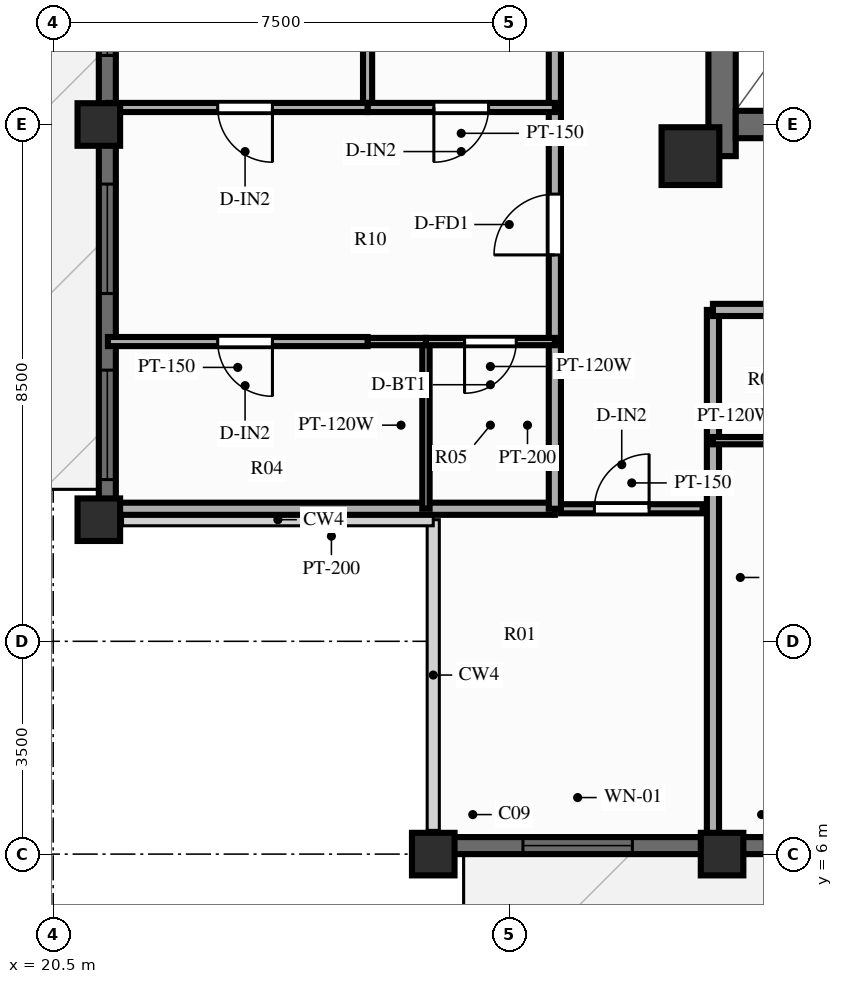
"""IFC4 building model, lengths in metres.
Left out: names, types, materials, properties, quantities, classifications, styles, units other than length and angle.
Written with IfcOpenShell. Run it as: python <this file> out.ifc"""

import sys

from ifc_helpers import new_model, si_unit, direction, frame, frame_2d, origin, origin_2d, place, context, subcontext, project, spatial, rectangle, extrude, source, transform, mapped, element, fill, save


model = new_model("IFC4")
c1 = context("Model", 3, precision=1e-05, world=origin(), true_north=direction((0.0, 1.0)))
c2 = subcontext(c1, "Body", "Model", "MODEL_VIEW")
j1 = project(units=[si_unit("LENGTHUNIT", "METRE"), si_unit("PLANEANGLEUNIT", "RADIAN")], contexts=[c1])
p1 = place(None, origin())
s1 = spatial("IfcSite", under=j1, at=p1, CompositionType="ELEMENT")
p2 = place(p1, origin())
s2 = spatial("IfcBuilding", under=s1, at=p2, CompositionType="ELEMENT")
p3 = place(p2, frame((0.0, 0.0, 226.2)))
s3 = spatial("IfcBuildingStorey", under=s2, at=p3, CompositionType="ELEMENT", Elevation=226.2)
p4 = place(p3, frame((31.5, 17.48, 0.0), z_axis=(0.0, 0.0, 1.0), x_axis=(0.0, 1.0, 0.0)))
e1 = element("IfcWall", 1, at=p4, inside=s3, PredefinedType="SHEAR", context=c2, shape_type="SweptSolid", body=[
    extrude(rectangle(XDim=19.04, YDim=0.45, at=frame_2d((9.52, 0.0))), origin(), (0.0, 0.0, 1.0), 3.9),
])
p5 = place(p4, frame((6.32, 0.0, 0.0)))
e2 = element("IfcOpeningElement", 2, at=p5, cuts=e1, PredefinedType="OPENING", context=c2, shape_type="SweptSolid", body=[
    extrude(rectangle(XDim=1.1, YDim=2.15, at=frame_2d((0.55, 1.075))), frame((0.0, 0.237, 0.0), z_axis=(0.0, -1.0, 0.0), x_axis=(1.0, 0.0, 0.0)), (0.0, 0.0, 1.0), 0.474),
])
p6 = place(p3, frame((31.725, 18.0, 0.0), z_axis=(0.0, 0.0, 1.0), x_axis=(1.0, 0.0, 0.0)))
e3 = element("IfcWall", 3, at=p6, inside=s3, PredefinedType="SHEAR", context=c2, shape_type="SweptSolid", body=[
    extrude(rectangle(XDim=12.55, YDim=0.45, at=frame_2d((6.275, 0.0))), origin(), (0.0, 0.0, 1.0), 3.9),
])
m1 = source(origin(), c2, "Body", "SweptSolid", [
    extrude(rectangle(XDim=0.95, YDim=0.95, at=origin_2d()), origin(), (0.0, 0.0, 1.0), 3.9),
])
p7 = place(p3, frame((30.98, 17.48, 0.0), z_axis=(0.0, 0.0, 1.0), x_axis=(1.0, 0.0, 0.0)))
e4 = element("IfcColumn", 4, at=p7, inside=s3, PredefinedType="COLUMN", context=c2, shape_type="MappedRepresentation", body=[
    mapped(m1, transform((0.0, 0.0, 0.0), scale=1.0)),
])
m2 = source(origin(), c2, "Body", "SweptSolid", [
    extrude(rectangle(XDim=0.7, YDim=0.7, at=origin_2d()), origin(), (0.0, 0.0, 1.0), 3.9),
])
for number, where, z_axis, x_axis in (
    (5, (26.75, 6.0, 0.0), (0.0, 0.0, 1.0), (1.0, 0.0, 0.0)),
    (6, (31.5, 6.0, 0.0), (0.0, 0.0, 1.0), (1.0, 0.0, 0.0)),
    (7, (21.25, 18.0, 0.0), (0.0, 0.0, 1.0), (1.0, 0.0, 0.0)),
    (8, (21.25, 11.5, 0.0), (0.0, 0.0, 1.0), (1.0, 0.0, 0.0)),
):
    element("IfcColumn", number, at=place(p3, frame(where, z_axis=z_axis, x_axis=x_axis)), inside=s3, PredefinedType="COLUMN", context=c2, shape_type="MappedRepresentation", body=[
        mapped(m2, transform((0.0, 0.0, 0.0), scale=1.0)),
    ])
p8 = place(p3, frame((26.75, 6.14, 0.0), z_axis=(0.0, 0.0, 1.0), x_axis=(1.0, 0.0, 0.0)))
e9 = element("IfcWall", 9, at=p8, inside=s3, PredefinedType="SOLIDWALL", context=c2, shape_type="SweptSolid", body=[
    extrude(rectangle(XDim=22.5, YDim=0.28, at=frame_2d((11.25, 0.0))), origin(), (0.0, 0.0, 1.0), 2.79),
])
p9 = place(p8, frame((1.475, 0.0, 0.85)))
e10 = element("IfcOpeningElement", 10, at=p9, cuts=e9, PredefinedType="OPENING", context=c2, shape_type="SweptSolid", body=[
    extrude(rectangle(XDim=1.8, YDim=1.65, at=frame_2d((0.9, 0.825))), frame((0.0, 0.152, 0.0), z_axis=(0.0, -1.0, 0.0), x_axis=(1.0, 0.0, 0.0)), (0.0, 0.0, 1.0), 0.304),
])
p10 = place(p8, frame((5.445, 0.0, 0.85)))
e11 = element("IfcOpeningElement", 11, at=p10, cuts=e9, PredefinedType="OPENING", context=c2, shape_type="SweptSolid", body=[
    extrude(rectangle(XDim=1.5, YDim=1.65, at=frame_2d((0.75, 0.825))), frame((0.0, 0.152, 0.0), z_axis=(0.0, -1.0, 0.0), x_axis=(1.0, 0.0, 0.0)), (0.0, 0.0, 1.0), 0.304),
])
p11 = place(p8, frame((8.45, 0.0, 0.85)))
e12 = element("IfcOpeningElement", 12, at=p11, cuts=e9, PredefinedType="OPENING", context=c2, shape_type="SweptSolid", body=[
    extrude(rectangle(XDim=1.8, YDim=1.65, at=frame_2d((0.9, 0.825))), frame((0.0, 0.152, 0.0), z_axis=(0.0, -1.0, 0.0), x_axis=(1.0, 0.0, 0.0)), (0.0, 0.0, 1.0), 0.304),
])
p12 = place(p8, frame((13.7, 0.0, 0.0), z_axis=(0.0, 0.0, 1.0), x_axis=(-1.0, 0.0, 0.0)))
e13 = element("IfcOpeningElement", 13, at=p12, cuts=e9, PredefinedType="OPENING", context=c2, shape_type="SweptSolid", body=[
    extrude(rectangle(XDim=1.1, YDim=2.15, at=frame_2d((0.55, 1.075))), frame((0.0, 0.152, 0.0), z_axis=(0.0, -1.0, 0.0), x_axis=(1.0, 0.0, 0.0)), (0.0, 0.0, 1.0), 0.304),
])
p13 = place(p8, frame((15.555, 0.0, 0.85)))
e14 = element("IfcOpeningElement", 14, at=p13, cuts=e9, PredefinedType="OPENING", context=c2, shape_type="SweptSolid", body=[
    extrude(rectangle(XDim=1.5, YDim=1.65, at=frame_2d((0.75, 0.825))), frame((0.0, 0.152, 0.0), z_axis=(0.0, -1.0, 0.0), x_axis=(1.0, 0.0, 0.0)), (0.0, 0.0, 1.0), 0.304),
])
p14 = place(p8, frame((19.225, 0.0, 0.85)))
e15 = element("IfcOpeningElement", 15, at=p14, cuts=e9, PredefinedType="OPENING", context=c2, shape_type="SweptSolid", body=[
    extrude(rectangle(XDim=1.8, YDim=1.65, at=frame_2d((0.9, 0.825))), frame((0.0, 0.152, 0.0), z_axis=(0.0, -1.0, 0.0), x_axis=(1.0, 0.0, 0.0)), (0.0, 0.0, 1.0), 0.304),
])
p15 = place(p3, frame((21.39, 11.5, 0.0), z_axis=(0.0, 0.0, 1.0), x_axis=(0.0, 1.0, 0.0)))
e16 = element("IfcWall", 16, at=p15, inside=s3, PredefinedType="SOLIDWALL", context=c2, shape_type="SweptSolid", body=[
    extrude(rectangle(XDim=31.0, YDim=0.28, at=frame_2d((15.5, 0.0))), origin(), (0.0, 0.0, 1.0), 2.79),
])
p16 = place(p15, frame((0.66, 0.0, 0.85)))
e17 = element("IfcOpeningElement", 17, at=p16, cuts=e16, PredefinedType="OPENING", context=c2, shape_type="SweptSolid", body=[
    extrude(rectangle(XDim=1.8, YDim=1.65, at=frame_2d((0.9, 0.825))), frame((0.0, 0.152, 0.0), z_axis=(0.0, -1.0, 0.0), x_axis=(1.0, 0.0, 0.0)), (0.0, 0.0, 1.0), 0.304),
])
p17 = place(p15, frame((3.72, 0.0, 0.85)))
e18 = element("IfcOpeningElement", 18, at=p17, cuts=e16, PredefinedType="OPENING", context=c2, shape_type="SweptSolid", body=[
    extrude(rectangle(XDim=1.8, YDim=1.65, at=frame_2d((0.9, 0.825))), frame((0.0, 0.152, 0.0), z_axis=(0.0, -1.0, 0.0), x_axis=(1.0, 0.0, 0.0)), (0.0, 0.0, 1.0), 0.304),
])
p18 = place(p15, frame((7.635, 0.0, 0.85)))
e19 = element("IfcOpeningElement", 19, at=p18, cuts=e16, PredefinedType="OPENING", context=c2, shape_type="SweptSolid", body=[
    extrude(rectangle(XDim=1.8, YDim=1.65, at=frame_2d((0.9, 0.825))), frame((0.0, 0.152, 0.0), z_axis=(0.0, -1.0, 0.0), x_axis=(1.0, 0.0, 0.0)), (0.0, 0.0, 1.0), 0.304),
])
p19 = place(p15, frame((10.766, 0.0, 0.85)))
e20 = element("IfcOpeningElement", 20, at=p19, cuts=e16, PredefinedType="OPENING", context=c2, shape_type="SweptSolid", body=[
    extrude(rectangle(XDim=1.8, YDim=1.65, at=frame_2d((0.9, 0.825))), frame((0.0, 0.152, 0.0), z_axis=(0.0, -1.0, 0.0), x_axis=(1.0, 0.0, 0.0)), (0.0, 0.0, 1.0), 0.304),
])
p20 = place(p15, frame((14.0, 0.0, 0.0)))
e21 = element("IfcOpeningElement", 21, at=p20, cuts=e16, PredefinedType="OPENING", context=c2, shape_type="SweptSolid", body=[
    extrude(rectangle(XDim=1.6, YDim=2.15, at=frame_2d((0.8, 1.075))), frame((0.0, 0.152, 0.0), z_axis=(0.0, -1.0, 0.0), x_axis=(1.0, 0.0, 0.0)), (0.0, 0.0, 1.0), 0.304),
])
p21 = place(p15, frame((17.581, 0.0, 0.85)))
e22 = element("IfcOpeningElement", 22, at=p21, cuts=e16, PredefinedType="OPENING", context=c2, shape_type="SweptSolid", body=[
    extrude(rectangle(XDim=1.8, YDim=1.65, at=frame_2d((0.9, 0.825))), frame((0.0, 0.152, 0.0), z_axis=(0.0, -1.0, 0.0), x_axis=(1.0, 0.0, 0.0)), (0.0, 0.0, 1.0), 0.304),
])
p22 = place(p15, frame((20.877, 0.0, 0.85)))
e23 = element("IfcOpeningElement", 23, at=p22, cuts=e16, PredefinedType="OPENING", context=c2, shape_type="SweptSolid", body=[
    extrude(rectangle(XDim=1.8, YDim=1.65, at=frame_2d((0.9, 0.825))), frame((0.0, 0.152, 0.0), z_axis=(0.0, -1.0, 0.0), x_axis=(1.0, 0.0, 0.0)), (0.0, 0.0, 1.0), 0.304),
])
p23 = place(p15, frame((25.176, 0.0, 0.85)))
e24 = element("IfcOpeningElement", 24, at=p23, cuts=e16, PredefinedType="OPENING", context=c2, shape_type="SweptSolid", body=[
    extrude(rectangle(XDim=1.2, YDim=1.5, at=frame_2d((0.6, 0.75))), frame((0.0, 0.152, 0.0), z_axis=(0.0, -1.0, 0.0), x_axis=(1.0, 0.0, 0.0)), (0.0, 0.0, 1.0), 0.304),
])
p24 = place(p15, frame((27.936, 0.0, 0.85)))
e25 = element("IfcOpeningElement", 25, at=p24, cuts=e16, PredefinedType="OPENING", context=c2, shape_type="SweptSolid", body=[
    extrude(rectangle(XDim=1.8, YDim=1.65, at=frame_2d((0.9, 0.825))), frame((0.0, 0.152, 0.0), z_axis=(0.0, -1.0, 0.0), x_axis=(1.0, 0.0, 0.0)), (0.0, 0.0, 1.0), 0.304),
])
p25 = place(p3, frame((28.85, 11.68, 0.0), z_axis=(0.0, 0.0, 1.0), x_axis=(1.0, 0.0, 0.0)))
e26 = element("IfcWall", 26, at=p25, inside=s3, PredefinedType="PARTITIONING", context=c2, shape_type="SweptSolid", body=[
    extrude(rectangle(XDim=2.33, YDim=0.15, at=frame_2d((1.165, 0.0))), origin(), (0.0, 0.0, 1.0), 3.69),
])
p26 = place(p25, frame((0.55, 0.0, 0.0)))
e27 = element("IfcOpeningElement", 27, at=p26, cuts=e26, PredefinedType="OPENING", context=c2, shape_type="SweptSolid", body=[
    extrude(rectangle(XDim=0.9, YDim=2.1, at=frame_2d((0.45, 1.05))), frame((0.0, 0.087, 0.0), z_axis=(0.0, -1.0, 0.0), x_axis=(1.0, 0.0, 0.0)), (0.0, 0.0, 1.0), 0.174),
])
p27 = place(p3, frame((31.35, 14.95, 0.0), z_axis=(0.0, 0.0, 1.0), x_axis=(0.0, -1.0, 0.0)))
e28 = element("IfcWall", 28, at=p27, inside=s3, PredefinedType="PARTITIONING", context=c2, shape_type="SweptSolid", body=[
    extrude(rectangle(XDim=8.8, YDim=0.2, at=frame_2d((4.4, 0.0))), origin(), (0.0, 0.0, 1.0), 2.79),
])
p28 = place(p3, frame((31.35, 14.95, 0.0), z_axis=(0.0, 0.0, 1.0), x_axis=(1.0, 0.0, 0.0)))
e29 = element("IfcWall", 29, at=p28, inside=s3, PredefinedType="PARTITIONING", context=c2, shape_type="SweptSolid", body=[
    extrude(rectangle(XDim=2.85, YDim=0.2, at=frame_2d((1.425, 0.0))), origin(), (0.0, 0.0, 1.0), 3.69),
])
p29 = place(p3, frame((31.35, 12.8, 0.0), z_axis=(0.0, 0.0, 1.0), x_axis=(1.0, 0.0, 0.0)))
e30 = element("IfcWall", 30, at=p29, inside=s3, PredefinedType="PARTITIONING", context=c2, shape_type="SweptSolid", body=[
    extrude(rectangle(XDim=2.85, YDim=0.12, at=frame_2d((1.425, 0.0))), origin(), (0.0, 0.0, 1.0), 3.69),
])
p30 = place(p3, frame((28.75, 11.68, 0.0), z_axis=(0.0, 0.0, 1.0), x_axis=(-1.0, 0.0, 0.0)))
e31 = element("IfcWall", 31, at=p30, inside=s3, PredefinedType="PARTITIONING", context=c2, shape_type="SweptSolid", body=[
    extrude(rectangle(XDim=7.35, YDim=0.2, at=frame_2d((3.675, 0.0))), origin(), (0.0, 0.0, 1.0), 3.69),
])
p31 = place(p3, frame((28.75, 11.68, 0.0), z_axis=(0.0, 0.0, 1.0), x_axis=(0.0, 1.0, 0.0)))
e32 = element("IfcWall", 32, at=p31, inside=s3, PredefinedType="PARTITIONING", context=c2, shape_type="SweptSolid", body=[
    extrude(rectangle(XDim=2.75, YDim=0.2, at=frame_2d((1.375, 0.0))), origin(), (0.0, 0.0, 1.0), 3.69),
])
p32 = place(p3, frame((28.75, 14.43, 0.0), z_axis=(0.0, 0.0, 1.0), x_axis=(0.0, 1.0, 0.0)))
e33 = element("IfcWall", 33, at=p32, inside=s3, PredefinedType="PARTITIONING", context=c2, shape_type="SweptSolid", body=[
    extrude(rectangle(XDim=3.85, YDim=0.2, at=frame_2d((1.925, 0.0))), origin(), (0.0, 0.0, 1.0), 3.69),
])
p33 = place(p32, frame((1.425, 0.0, 0.0)))
e34 = element("IfcOpeningElement", 34, at=p33, cuts=e33, PredefinedType="OPENING", context=c2, shape_type="SweptSolid", body=[
    extrude(rectangle(XDim=1.0, YDim=2.15, at=frame_2d((0.5, 1.075))), frame((0.0, 0.112, 0.0), z_axis=(0.0, -1.0, 0.0), x_axis=(1.0, 0.0, 0.0)), (0.0, 0.0, 1.0), 0.224),
])
p34 = place(p3, frame((28.75, 18.28, 0.0), z_axis=(0.0, 0.0, 1.0), x_axis=(0.0, 1.0, 0.0)))
e35 = element("IfcWall", 35, at=p34, inside=s3, PredefinedType="PARTITIONING", context=c2, shape_type="SweptSolid", body=[
    extrude(rectangle(XDim=3.511, YDim=0.2, at=frame_2d((1.756, 0.0))), origin(), (0.0, 0.0, 1.0), 3.69),
])
p35 = place(p3, frame((26.63, 11.68, 0.0), z_axis=(0.0, 0.0, 1.0), x_axis=(0.0, 1.0, 0.0)))
e36 = element("IfcWall", 36, at=p35, inside=s3, PredefinedType="PARTITIONING", context=c2, shape_type="SweptSolid", body=[
    extrude(rectangle(XDim=2.75, YDim=0.12, at=frame_2d((1.375, 0.0))), origin(), (0.0, 0.0, 1.0), 3.69),
])
p36 = place(p3, frame((25.67, 18.28, 0.0), z_axis=(0.0, 0.0, 1.0), x_axis=(0.0, 1.0, 0.0)))
e37 = element("IfcWall", 37, at=p36, inside=s3, PredefinedType="PARTITIONING", context=c2, shape_type="SweptSolid", body=[
    extrude(rectangle(XDim=3.511, YDim=0.15, at=frame_2d((1.756, 0.0))), origin(), (0.0, 0.0, 1.0), 3.39),
])
p37 = place(p3, frame((28.75, 14.43, 0.0), z_axis=(0.0, 0.0, 1.0), x_axis=(-1.0, 0.0, 0.0)))
e38 = element("IfcWall", 38, at=p37, inside=s3, PredefinedType="PARTITIONING", context=c2, shape_type="SweptSolid", body=[
    extrude(rectangle(XDim=2.12, YDim=0.12, at=frame_2d((1.06, 0.0))), origin(), (0.0, 0.0, 1.0), 3.69),
])
p38 = place(p37, frame((0.635, 0.0, 0.0)))
e39 = element("IfcOpeningElement", 39, at=p38, cuts=e38, PredefinedType="OPENING", context=c2, shape_type="SweptSolid", body=[
    extrude(rectangle(XDim=0.85, YDim=2.05, at=frame_2d((0.425, 1.025))), frame((0.0, 0.072, 0.0), z_axis=(0.0, -1.0, 0.0), x_axis=(1.0, 0.0, 0.0)), (0.0, 0.0, 1.0), 0.144),
])
p39 = place(p3, frame((26.63, 14.43, 0.0), z_axis=(0.0, 0.0, 1.0), x_axis=(-1.0, 0.0, 0.0)))
e40 = element("IfcWall", 40, at=p39, inside=s3, PredefinedType="PARTITIONING", context=c2, shape_type="SweptSolid", body=[
    extrude(rectangle(XDim=0.96, YDim=0.12, at=frame_2d((0.48, 0.0))), origin(), (0.0, 0.0, 1.0), 3.69),
])
p40 = place(p3, frame((25.67, 14.43, 0.0), z_axis=(0.0, 0.0, 1.0), x_axis=(-1.0, 0.0, 0.0)))
e41 = element("IfcWall", 41, at=p40, inside=s3, PredefinedType="PARTITIONING", context=c2, shape_type="SweptSolid", body=[
    extrude(rectangle(XDim=4.27, YDim=0.15, at=frame_2d((2.135, 0.0))), origin(), (0.0, 0.0, 1.0), 3.69),
])
p41 = place(p40, frame((1.565, 0.0, 0.0)))
e42 = element("IfcOpeningElement", 42, at=p41, cuts=e41, PredefinedType="OPENING", context=c2, shape_type="SweptSolid", body=[
    extrude(rectangle(XDim=0.9, YDim=2.1, at=frame_2d((0.45, 1.05))), frame((0.0, 0.087, 0.0), z_axis=(0.0, -1.0, 0.0), x_axis=(1.0, 0.0, 0.0)), (0.0, 0.0, 1.0), 0.174),
])
p42 = place(p3, frame((28.75, 18.28, 0.0), z_axis=(0.0, 0.0, 1.0), x_axis=(-1.0, 0.0, 0.0)))
e43 = element("IfcWall", 43, at=p42, inside=s3, PredefinedType="PARTITIONING", context=c2, shape_type="SweptSolid", body=[
    extrude(rectangle(XDim=3.08, YDim=0.15, at=frame_2d((1.54, 0.0))), origin(), (0.0, 0.0, 1.0), 3.69),
])
p43 = place(p42, frame((1.09, 0.0, 0.0)))
e44 = element("IfcOpeningElement", 44, at=p43, cuts=e43, PredefinedType="OPENING", context=c2, shape_type="SweptSolid", body=[
    extrude(rectangle(XDim=0.9, YDim=2.1, at=frame_2d((0.45, 1.05))), frame((0.0, 0.087, 0.0), z_axis=(0.0, -1.0, 0.0), x_axis=(1.0, 0.0, 0.0)), (0.0, 0.0, 1.0), 0.174),
])
p44 = place(p3, frame((25.67, 18.28, 0.0), z_axis=(0.0, 0.0, 1.0), x_axis=(-1.0, 0.0, 0.0)))
e45 = element("IfcWall", 45, at=p44, inside=s3, PredefinedType="PARTITIONING", context=c2, shape_type="SweptSolid", body=[
    extrude(rectangle(XDim=4.27, YDim=0.15, at=frame_2d((2.135, 0.0))), origin(), (0.0, 0.0, 1.0), 3.69),
])
p45 = place(p44, frame((1.565, 0.0, 0.0)))
e46 = element("IfcOpeningElement", 46, at=p45, cuts=e45, PredefinedType="OPENING", context=c2, shape_type="SweptSolid", body=[
    extrude(rectangle(XDim=0.9, YDim=2.1, at=frame_2d((0.45, 1.05))), frame((0.0, 0.087, 0.0), z_axis=(0.0, -1.0, 0.0), x_axis=(1.0, 0.0, 0.0)), (0.0, 0.0, 1.0), 0.174),
])
m3 = source(origin(), c2, "Body", "SweptSolid", [
    extrude(rectangle(XDim=1.8, YDim=1.65, at=frame_2d((0.9, 0.825))), frame((0.0, 0.03, 0.0), z_axis=(0.0, -1.0, 0.0), x_axis=(1.0, 0.0, 0.0)), (0.0, 0.0, 1.0), 0.06),
])
p46 = place(p9, origin())
e47 = element("IfcWindow", 47, at=p46, inside=s3, PartitioningType="SINGLE_PANEL", PredefinedType="WINDOW", context=c2, shape_type="MappedRepresentation", body=[
    mapped(m3, transform((0.0, 0.0, 0.0), scale=1.0)),
])
fill(e10, e47)
p47 = place(p16, origin())
e48 = element("IfcWindow", 48, at=p47, inside=s3, PartitioningType="SINGLE_PANEL", PredefinedType="WINDOW", context=c2, shape_type="MappedRepresentation", body=[
    mapped(m3, transform((0.0, 0.0, 0.0), scale=1.0)),
])
fill(e17, e48)
p48 = place(p17, origin())
e49 = element("IfcWindow", 49, at=p48, inside=s3, PartitioningType="SINGLE_PANEL", PredefinedType="WINDOW", context=c2, shape_type="MappedRepresentation", body=[
    mapped(m3, transform((0.0, 0.0, 0.0), scale=1.0)),
])
fill(e18, e49)
p49 = place(p18, origin())
e50 = element("IfcWindow", 50, at=p49, inside=s3, PartitioningType="SINGLE_PANEL", PredefinedType="WINDOW", context=c2, shape_type="MappedRepresentation", body=[
    mapped(m3, transform((0.0, 0.0, 0.0), scale=1.0)),
])
fill(e19, e50)
m4 = source(origin(), c2, "Body", "SweptSolid", [
    extrude(rectangle(XDim=0.9, YDim=2.1, at=frame_2d((0.45, 1.05))), frame((0.0, 0.025, 0.0), z_axis=(0.0, -1.0, 0.0), x_axis=(1.0, 0.0, 0.0)), (0.0, 0.0, 1.0), 0.05),
])
p50 = place(p26, origin())
e51 = element("IfcDoor", 51, at=p50, inside=s3, OperationType="SINGLE_SWING_RIGHT", PredefinedType="DOOR", context=c2, shape_type="MappedRepresentation", body=[
    mapped(m4, transform((0.0, 0.0, 0.0), scale=1.0)),
])
fill(e27, e51)
m5 = source(origin(), c2, "Body", "SweptSolid", [
    extrude(rectangle(XDim=1.0, YDim=2.15, at=frame_2d((0.5, 1.075))), frame((0.0, 0.025, 0.0), z_axis=(0.0, -1.0, 0.0), x_axis=(1.0, 0.0, 0.0)), (0.0, 0.0, 1.0), 0.05),
])
p51 = place(p33, origin())
e52 = element("IfcDoor", 52, at=p51, inside=s3, OperationType="SINGLE_SWING_LEFT", PredefinedType="DOOR", context=c2, shape_type="MappedRepresentation", body=[
    mapped(m5, transform((0.0, 0.0, 0.0), scale=1.0)),
])
fill(e34, e52)
m6 = source(origin(), c2, "Body", "SweptSolid", [
    extrude(rectangle(XDim=0.85, YDim=2.05, at=frame_2d((0.425, 1.025))), frame((0.0, 0.025, 0.0), z_axis=(0.0, -1.0, 0.0), x_axis=(1.0, 0.0, 0.0)), (0.0, 0.0, 1.0), 0.05),
])
p52 = place(p38, origin())
e53 = element("IfcDoor", 53, at=p52, inside=s3, OperationType="SINGLE_SWING_RIGHT", PredefinedType="DOOR", context=c2, shape_type="MappedRepresentation", body=[
    mapped(m6, transform((0.0, 0.0, 0.0), scale=1.0)),
])
fill(e39, e53)
p53 = place(p41, origin())
e54 = element("IfcDoor", 54, at=p53, inside=s3, OperationType="SINGLE_SWING_LEFT", PredefinedType="DOOR", context=c2, shape_type="MappedRepresentation", body=[
    mapped(m4, transform((0.0, 0.0, 0.0), scale=1.0)),
])
fill(e42, e54)
p54 = place(p43, origin())
e55 = element("IfcDoor", 55, at=p54, inside=s3, OperationType="SINGLE_SWING_RIGHT", PredefinedType="DOOR", context=c2, shape_type="MappedRepresentation", body=[
    mapped(m4, transform((0.0, 0.0, 0.0), scale=1.0)),
])
fill(e44, e55)
p55 = place(p45, origin())
e56 = element("IfcDoor", 56, at=p55, inside=s3, OperationType="SINGLE_SWING_LEFT", PredefinedType="DOOR", context=c2, shape_type="MappedRepresentation", body=[
    mapped(m4, transform((0.0, 0.0, 0.0), scale=1.0)),
])
fill(e46, e56)
save(model, sys.argv[1])
